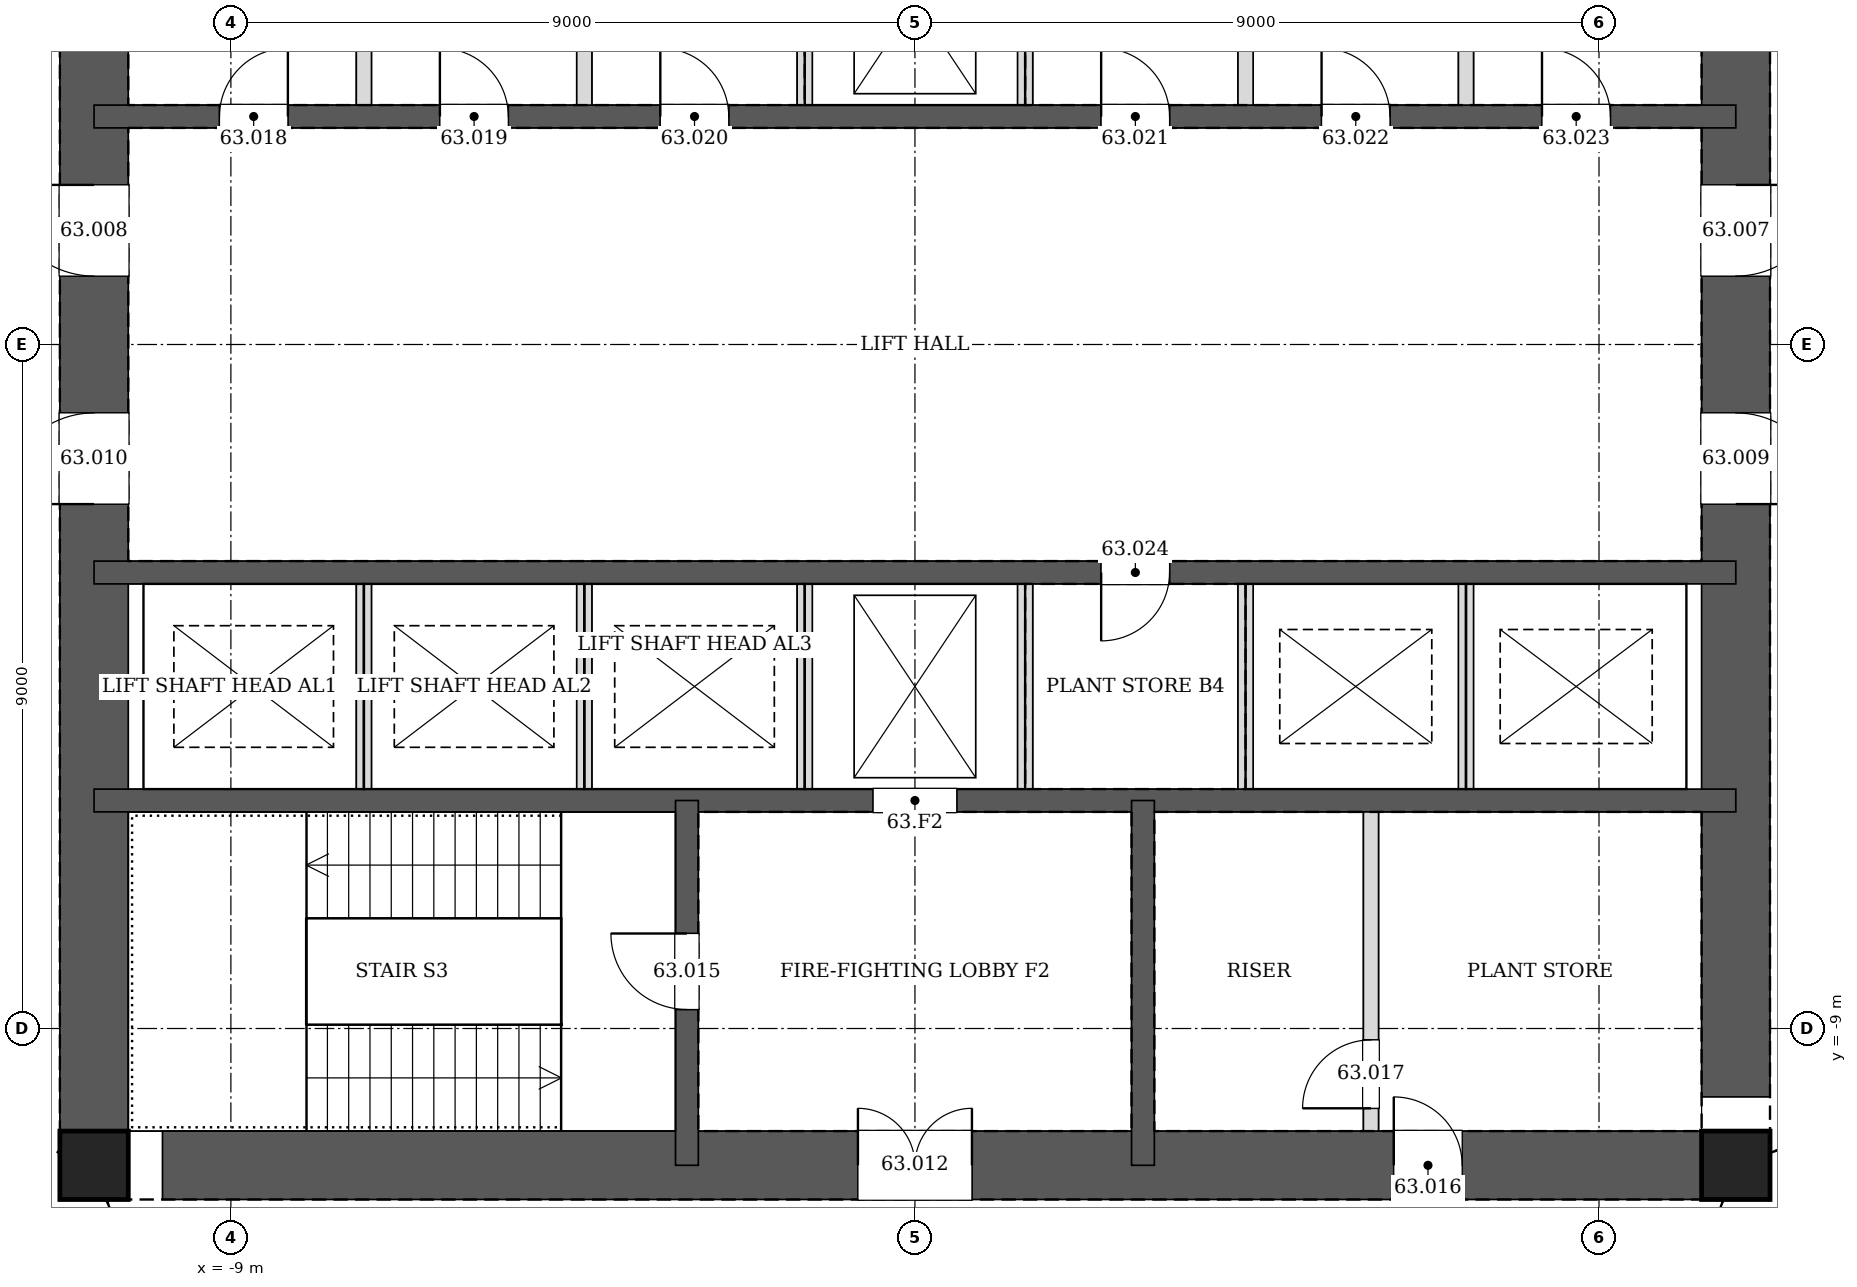
"""IFC4 building model, lengths in metres.
Left out: names, types, materials, properties, quantities, classifications, styles, units other than length and angle.
Written with IfcOpenShell. Run it as: python <this file> out.ifc"""

import sys

from ifc_helpers import new_model, si_unit, direction, frame, frame_2d, origin, origin_2d, place, context, subcontext, project, spatial, rectangle, hollow_rectangle, extrude, element, fill, save


model = new_model("IFC4")
c1 = context("Model", 3, precision=1e-05, world=origin(), true_north=direction((0.0, 1.0)))
c2 = subcontext(c1, "Body", "Model", "MODEL_VIEW")
j1 = project(units=[si_unit("LENGTHUNIT", "METRE"), si_unit("PLANEANGLEUNIT", "RADIAN")], contexts=[c1])
p1 = place(None, origin())
s1 = spatial("IfcSite", under=j1, at=p1, CompositionType="ELEMENT")
p2 = place(p1, origin())
s2 = spatial("IfcBuilding", under=s1, at=p2, CompositionType="ELEMENT")
p3 = place(p2, frame((0.0, 0.0, 261.8)))
s3 = spatial("IfcBuildingStorey", under=s2, at=p3, CompositionType="ELEMENT", Elevation=261.8)
for number, where, z_axis, x_axis in (
    (1, (-10.8, -10.8, 0.0), (0.0, 0.0, 1.0), (1.0, 0.0, 0.0)),
    (2, (10.8, -10.8, 0.0), (0.0, 0.0, 1.0), (1.0, 0.0, 0.0)),
):
    element("IfcColumn", number, at=place(p3, frame(where, z_axis=z_axis, x_axis=x_axis)), inside=s3, PredefinedType="COLUMN", context=c2, shape_type="SweptSolid", body=[
        extrude(hollow_rectangle(XDim=0.9, YDim=0.9, WallThickness=0.04, at=origin_2d()), origin(), (0.0, 0.0, 1.0), 4.5),
    ])
p4 = place(p3, frame((-10.8, -10.8, 0.0), z_axis=(0.0, 0.0, 1.0), x_axis=(1.0, 0.0, 0.0)))
e3 = element("IfcWall", 3, at=p4, inside=s3, PredefinedType="SOLIDWALL", context=c2, shape_type="SweptSolid", body=[
    extrude(rectangle(XDim=21.6, YDim=0.9, at=frame_2d((10.8, 0.0))), origin(), (0.0, 0.0, 1.0), 4.5),
])
p5 = place(p4, frame((10.05, 0.0, 0.0)))
e4 = element("IfcOpeningElement", 4, at=p5, cuts=e3, PredefinedType="OPENING", context=c2, shape_type="SweptSolid", body=[
    extrude(rectangle(XDim=1.5, YDim=2.1, at=frame_2d((0.75, 1.05))), frame((0.0, 0.46, 0.0), z_axis=(0.0, -1.0, 0.0), x_axis=(1.0, 0.0, 0.0)), (0.0, 0.0, 1.0), 0.92),
])
p6 = place(p4, frame((17.1, 0.0, 0.0)))
e5 = element("IfcOpeningElement", 5, at=p6, cuts=e3, PredefinedType="OPENING", context=c2, shape_type="SweptSolid", body=[
    extrude(rectangle(XDim=0.9, YDim=2.1, at=frame_2d((0.45, 1.05))), frame((0.0, 0.46, 0.0), z_axis=(0.0, -1.0, 0.0), x_axis=(1.0, 0.0, 0.0)), (0.0, 0.0, 1.0), 0.92),
])
p7 = place(p3, frame((10.8, -10.8, 0.0), z_axis=(0.0, 0.0, 1.0), x_axis=(0.0, 1.0, 0.0)))
e6 = element("IfcWall", 6, at=p7, inside=s3, PredefinedType="SOLIDWALL", context=c2, shape_type="SweptSolid", body=[
    extrude(rectangle(XDim=21.6, YDim=0.9, at=frame_2d((10.8, 0.0))), origin(), (0.0, 0.0, 1.0), 4.5),
])
p8 = place(p7, frame((11.7, 0.0, 0.0)))
e7 = element("IfcOpeningElement", 7, at=p8, cuts=e6, PredefinedType="OPENING", context=c2, shape_type="SweptSolid", body=[
    extrude(rectangle(XDim=1.2, YDim=2.1, at=frame_2d((0.6, 1.05))), frame((0.0, 0.46, 0.0), z_axis=(0.0, -1.0, 0.0), x_axis=(1.0, 0.0, 0.0)), (0.0, 0.0, 1.0), 0.92),
])
p9 = place(p7, frame((8.7, 0.0, 0.0)))
e8 = element("IfcOpeningElement", 8, at=p9, cuts=e6, PredefinedType="OPENING", context=c2, shape_type="SweptSolid", body=[
    extrude(rectangle(XDim=1.2, YDim=2.1, at=frame_2d((0.6, 1.05))), frame((0.0, 0.46, 0.0), z_axis=(0.0, -1.0, 0.0), x_axis=(1.0, 0.0, 0.0)), (0.0, 0.0, 1.0), 0.92),
])
p10 = place(p3, frame((-10.8, 10.8, 0.0), z_axis=(0.0, 0.0, 1.0), x_axis=(0.0, -1.0, 0.0)))
e9 = element("IfcWall", 9, at=p10, inside=s3, PredefinedType="SOLIDWALL", context=c2, shape_type="SweptSolid", body=[
    extrude(rectangle(XDim=21.6, YDim=0.9, at=frame_2d((10.8, 0.0))), origin(), (0.0, 0.0, 1.0), 4.5),
])
p11 = place(p10, frame((8.7, 0.0, 0.0)))
e10 = element("IfcOpeningElement", 10, at=p11, cuts=e9, PredefinedType="OPENING", context=c2, shape_type="SweptSolid", body=[
    extrude(rectangle(XDim=1.2, YDim=2.1, at=frame_2d((0.6, 1.05))), frame((0.0, 0.46, 0.0), z_axis=(0.0, -1.0, 0.0), x_axis=(1.0, 0.0, 0.0)), (0.0, 0.0, 1.0), 0.92),
])
p12 = place(p10, frame((11.7, 0.0, 0.0)))
e11 = element("IfcOpeningElement", 11, at=p12, cuts=e9, PredefinedType="OPENING", context=c2, shape_type="SweptSolid", body=[
    extrude(rectangle(XDim=1.2, YDim=2.1, at=frame_2d((0.6, 1.05))), frame((0.0, 0.46, 0.0), z_axis=(0.0, -1.0, 0.0), x_axis=(1.0, 0.0, 0.0)), (0.0, 0.0, 1.0), 0.92),
])
p13 = place(p3, frame((-10.8, 3.0, 0.0), z_axis=(0.0, 0.0, 1.0), x_axis=(1.0, 0.0, 0.0)))
e12 = element("IfcWall", 12, at=p13, inside=s3, PredefinedType="SOLIDWALL", context=c2, shape_type="SweptSolid", body=[
    extrude(rectangle(XDim=21.6, YDim=0.3, at=frame_2d((10.8, 0.0))), origin(), (0.0, 0.0, 1.0), 4.5),
])
p14 = place(p13, frame((1.65, 0.0, 0.0)))
e13 = element("IfcOpeningElement", 13, at=p14, cuts=e12, PredefinedType="OPENING", context=c2, shape_type="SweptSolid", body=[
    extrude(rectangle(XDim=0.9, YDim=2.1, at=frame_2d((0.45, 1.05))), frame((0.0, 0.16, 0.0), z_axis=(0.0, -1.0, 0.0), x_axis=(1.0, 0.0, 0.0)), (0.0, 0.0, 1.0), 0.32),
])
p15 = place(p13, frame((4.55, 0.0, 0.0)))
e14 = element("IfcOpeningElement", 14, at=p15, cuts=e12, PredefinedType="OPENING", context=c2, shape_type="SweptSolid", body=[
    extrude(rectangle(XDim=0.9, YDim=2.1, at=frame_2d((0.45, 1.05))), frame((0.0, 0.16, 0.0), z_axis=(0.0, -1.0, 0.0), x_axis=(1.0, 0.0, 0.0)), (0.0, 0.0, 1.0), 0.32),
])
p16 = place(p13, frame((7.45, 0.0, 0.0)))
e15 = element("IfcOpeningElement", 15, at=p16, cuts=e12, PredefinedType="OPENING", context=c2, shape_type="SweptSolid", body=[
    extrude(rectangle(XDim=0.9, YDim=2.1, at=frame_2d((0.45, 1.05))), frame((0.0, 0.16, 0.0), z_axis=(0.0, -1.0, 0.0), x_axis=(1.0, 0.0, 0.0)), (0.0, 0.0, 1.0), 0.32),
])
p17 = place(p13, frame((13.25, 0.0, 0.0)))
e16 = element("IfcOpeningElement", 16, at=p17, cuts=e12, PredefinedType="OPENING", context=c2, shape_type="SweptSolid", body=[
    extrude(rectangle(XDim=0.9, YDim=2.1, at=frame_2d((0.45, 1.05))), frame((0.0, 0.16, 0.0), z_axis=(0.0, -1.0, 0.0), x_axis=(1.0, 0.0, 0.0)), (0.0, 0.0, 1.0), 0.32),
])
p18 = place(p13, frame((16.15, 0.0, 0.0)))
e17 = element("IfcOpeningElement", 17, at=p18, cuts=e12, PredefinedType="OPENING", context=c2, shape_type="SweptSolid", body=[
    extrude(rectangle(XDim=0.9, YDim=2.1, at=frame_2d((0.45, 1.05))), frame((0.0, 0.16, 0.0), z_axis=(0.0, -1.0, 0.0), x_axis=(1.0, 0.0, 0.0)), (0.0, 0.0, 1.0), 0.32),
])
p19 = place(p13, frame((19.05, 0.0, 0.0)))
e18 = element("IfcOpeningElement", 18, at=p19, cuts=e12, PredefinedType="OPENING", context=c2, shape_type="SweptSolid", body=[
    extrude(rectangle(XDim=0.9, YDim=2.1, at=frame_2d((0.45, 1.05))), frame((0.0, 0.16, 0.0), z_axis=(0.0, -1.0, 0.0), x_axis=(1.0, 0.0, 0.0)), (0.0, 0.0, 1.0), 0.32),
])
p20 = place(p3, frame((-10.8, -3.0, 0.0), z_axis=(0.0, 0.0, 1.0), x_axis=(1.0, 0.0, 0.0)))
e19 = element("IfcWall", 19, at=p20, inside=s3, PredefinedType="SOLIDWALL", context=c2, shape_type="SweptSolid", body=[
    extrude(rectangle(XDim=21.6, YDim=0.3, at=frame_2d((10.8, 0.0))), origin(), (0.0, 0.0, 1.0), 4.5),
])
p21 = place(p20, frame((13.25, 0.0, 0.0)))
e20 = element("IfcOpeningElement", 20, at=p21, cuts=e19, PredefinedType="OPENING", context=c2, shape_type="SweptSolid", body=[
    extrude(rectangle(XDim=0.9, YDim=2.1, at=frame_2d((0.45, 1.05))), frame((0.0, 0.16, 0.0), z_axis=(0.0, -1.0, 0.0), x_axis=(1.0, 0.0, 0.0)), (0.0, 0.0, 1.0), 0.32),
])
p22 = place(p3, frame((-10.8, -6.0, 0.0), z_axis=(0.0, 0.0, 1.0), x_axis=(1.0, 0.0, 0.0)))
e21 = element("IfcWall", 21, at=p22, inside=s3, PredefinedType="SOLIDWALL", context=c2, shape_type="SweptSolid", body=[
    extrude(rectangle(XDim=21.6, YDim=0.3, at=frame_2d((10.8, 0.0))), origin(), (0.0, 0.0, 1.0), 4.5),
])
p23 = place(p22, frame((10.25, 0.0, 0.0)))
e22 = element("IfcOpeningElement", 22, at=p23, cuts=e21, PredefinedType="OPENING", context=c2, shape_type="SweptSolid", body=[
    extrude(rectangle(XDim=1.1, YDim=2.1, at=frame_2d((0.55, 1.05))), frame((0.0, 0.16, 0.0), z_axis=(0.0, -1.0, 0.0), x_axis=(1.0, 0.0, 0.0)), (0.0, 0.0, 1.0), 0.32),
])
p24 = place(p3, frame((-3.0, -6.0, 0.0), z_axis=(0.0, 0.0, 1.0), x_axis=(0.0, -1.0, 0.0)))
e23 = element("IfcWall", 23, at=p24, inside=s3, PredefinedType="SOLIDWALL", context=c2, shape_type="SweptSolid", body=[
    extrude(rectangle(XDim=4.8, YDim=0.3, at=frame_2d((2.4, 0.0))), origin(), (0.0, 0.0, 1.0), 4.5),
])
p25 = place(p24, frame((1.75, 0.0, 0.0)))
e24 = element("IfcOpeningElement", 24, at=p25, cuts=e23, PredefinedType="OPENING", context=c2, shape_type="SweptSolid", body=[
    extrude(rectangle(XDim=1.0, YDim=2.1, at=frame_2d((0.5, 1.05))), frame((0.0, 0.16, 0.0), z_axis=(0.0, -1.0, 0.0), x_axis=(1.0, 0.0, 0.0)), (0.0, 0.0, 1.0), 0.32),
])
p26 = place(p3, frame((3.0, -6.0, 0.0), z_axis=(0.0, 0.0, 1.0), x_axis=(0.0, -1.0, 0.0)))
e25 = element("IfcWall", 25, at=p26, inside=s3, PredefinedType="SOLIDWALL", context=c2, shape_type="SweptSolid", body=[
    extrude(rectangle(XDim=4.8, YDim=0.3, at=frame_2d((2.4, 0.0))), origin(), (0.0, 0.0, 1.0), 4.5),
])
for number, where, z_axis, x_axis in (
    (26, (-7.25, 3.15, 0.0), (0.0, 0.0, 1.0), (0.0, 1.0, 0.0)),
    (27, (-4.35, 3.15, 0.0), (0.0, 0.0, 1.0), (0.0, 1.0, 0.0)),
    (28, (-1.45, 3.15, 0.0), (0.0, 0.0, 1.0), (0.0, 1.0, 0.0)),
    (29, (1.45, 3.15, 0.0), (0.0, 0.0, 1.0), (0.0, 1.0, 0.0)),
    (30, (4.35, 3.15, 0.0), (0.0, 0.0, 1.0), (0.0, 1.0, 0.0)),
    (31, (7.25, 3.15, 0.0), (0.0, 0.0, 1.0), (0.0, 1.0, 0.0)),
    (32, (-7.25, -5.85, 0.0), (0.0, 0.0, 1.0), (0.0, 1.0, 0.0)),
    (33, (-4.35, -5.85, 0.0), (0.0, 0.0, 1.0), (0.0, 1.0, 0.0)),
    (34, (-1.45, -5.85, 0.0), (0.0, 0.0, 1.0), (0.0, 1.0, 0.0)),
    (35, (1.45, -5.85, 0.0), (0.0, 0.0, 1.0), (0.0, 1.0, 0.0)),
    (36, (4.35, -5.85, 0.0), (0.0, 0.0, 1.0), (0.0, 1.0, 0.0)),
):
    element("IfcWall", number, at=place(p3, frame(where, z_axis=z_axis, x_axis=x_axis)), inside=s3, PredefinedType="PARTITIONING", context=c2, shape_type="SweptSolid", body=[
        extrude(rectangle(XDim=2.7, YDim=0.2, at=frame_2d((1.35, 0.0))), origin(), (0.0, 0.0, 1.0), 4.25),
    ])
p27 = place(p3, frame((7.25, -5.85, 0.0), z_axis=(0.0, 0.0, 1.0), x_axis=(0.0, 1.0, 0.0)))
e37 = element("IfcWall", 37, at=p27, inside=s3, PredefinedType="PARTITIONING", context=c2, shape_type="SweptSolid", body=[
    extrude(rectangle(XDim=2.7, YDim=0.2, at=frame_2d((1.35, 0.0))), origin(), (0.0, 0.0, 1.0), 4.5),
])
p28 = place(p3, frame((6.0, -10.35, 0.0), z_axis=(0.0, 0.0, 1.0), x_axis=(0.0, 1.0, 0.0)))
e38 = element("IfcWall", 38, at=p28, inside=s3, PredefinedType="PARTITIONING", context=c2, shape_type="SweptSolid", body=[
    extrude(rectangle(XDim=4.2, YDim=0.2, at=frame_2d((2.1, 0.0))), origin(), (0.0, 0.0, 1.0), 4.25),
])
p29 = place(p28, frame((0.3, 0.0, 0.0)))
e39 = element("IfcOpeningElement", 39, at=p29, cuts=e38, PredefinedType="OPENING", context=c2, shape_type="SweptSolid", body=[
    extrude(rectangle(XDim=0.9, YDim=2.1, at=frame_2d((0.45, 1.05))), frame((0.0, 0.11, 0.0), z_axis=(0.0, -1.0, 0.0), x_axis=(1.0, 0.0, 0.0)), (0.0, 0.0, 1.0), 0.22),
])
p30 = place(p8, frame((1.2, 0.0, 0.0), z_axis=(0.0, 0.0, 1.0), x_axis=(-1.0, 0.0, 0.0)))
e40 = element("IfcDoor", 40, at=p30, inside=s3, OperationType="SINGLE_SWING_LEFT", PredefinedType="DOOR", context=c2, shape_type="SweptSolid", body=[
    extrude(rectangle(XDim=1.2, YDim=2.1, at=frame_2d((0.6, 1.05))), frame((0.0, 0.025, 0.0), z_axis=(0.0, -1.0, 0.0), x_axis=(1.0, 0.0, 0.0)), (0.0, 0.0, 1.0), 0.05),
])
fill(e7, e40)
p31 = place(p11, frame((1.2, 0.0, 0.0), z_axis=(0.0, 0.0, 1.0), x_axis=(-1.0, 0.0, 0.0)))
e41 = element("IfcDoor", 41, at=p31, inside=s3, OperationType="SINGLE_SWING_RIGHT", PredefinedType="DOOR", context=c2, shape_type="SweptSolid", body=[
    extrude(rectangle(XDim=1.2, YDim=2.1, at=frame_2d((0.6, 1.05))), frame((0.0, 0.025, 0.0), z_axis=(0.0, -1.0, 0.0), x_axis=(1.0, 0.0, 0.0)), (0.0, 0.0, 1.0), 0.05),
])
fill(e10, e41)
p32 = place(p9, frame((1.2, 0.0, 0.0), z_axis=(0.0, 0.0, 1.0), x_axis=(-1.0, 0.0, 0.0)))
e42 = element("IfcDoor", 42, at=p32, inside=s3, OperationType="SINGLE_SWING_RIGHT", PredefinedType="DOOR", context=c2, shape_type="SweptSolid", body=[
    extrude(rectangle(XDim=1.2, YDim=2.1, at=frame_2d((0.6, 1.05))), frame((0.0, 0.025, 0.0), z_axis=(0.0, -1.0, 0.0), x_axis=(1.0, 0.0, 0.0)), (0.0, 0.0, 1.0), 0.05),
])
fill(e8, e42)
p33 = place(p12, frame((1.2, 0.0, 0.0), z_axis=(0.0, 0.0, 1.0), x_axis=(-1.0, 0.0, 0.0)))
e43 = element("IfcDoor", 43, at=p33, inside=s3, OperationType="SINGLE_SWING_LEFT", PredefinedType="DOOR", context=c2, shape_type="SweptSolid", body=[
    extrude(rectangle(XDim=1.2, YDim=2.1, at=frame_2d((0.6, 1.05))), frame((0.0, 0.025, 0.0), z_axis=(0.0, -1.0, 0.0), x_axis=(1.0, 0.0, 0.0)), (0.0, 0.0, 1.0), 0.05),
])
fill(e11, e43)
p34 = place(p5, origin())
e44 = element("IfcDoor", 44, at=p34, inside=s3, OperationType="DOUBLE_DOOR_SINGLE_SWING", PredefinedType="DOOR", context=c2, shape_type="SweptSolid", body=[
    extrude(rectangle(XDim=1.5, YDim=2.1, at=frame_2d((0.75, 1.05))), frame((0.0, 0.025, 0.0), z_axis=(0.0, -1.0, 0.0), x_axis=(1.0, 0.0, 0.0)), (0.0, 0.0, 1.0), 0.05),
])
fill(e4, e44)
p35 = place(p25, frame((1.0, 0.0, 0.0), z_axis=(0.0, 0.0, 1.0), x_axis=(-1.0, 0.0, 0.0)))
e45 = element("IfcDoor", 45, at=p35, inside=s3, OperationType="SINGLE_SWING_RIGHT", PredefinedType="DOOR", context=c2, shape_type="SweptSolid", body=[
    extrude(rectangle(XDim=1.0, YDim=2.1, at=frame_2d((0.5, 1.05))), frame((0.0, 0.025, 0.0), z_axis=(0.0, -1.0, 0.0), x_axis=(1.0, 0.0, 0.0)), (0.0, 0.0, 1.0), 0.05),
])
fill(e24, e45)
p36 = place(p6, origin())
e46 = element("IfcDoor", 46, at=p36, inside=s3, OperationType="SINGLE_SWING_LEFT", PredefinedType="DOOR", context=c2, shape_type="SweptSolid", body=[
    extrude(rectangle(XDim=0.9, YDim=2.1, at=frame_2d((0.45, 1.05))), frame((0.0, 0.025, 0.0), z_axis=(0.0, -1.0, 0.0), x_axis=(1.0, 0.0, 0.0)), (0.0, 0.0, 1.0), 0.05),
])
fill(e5, e46)
p37 = place(p29, origin())
e47 = element("IfcDoor", 47, at=p37, inside=s3, OperationType="SINGLE_SWING_LEFT", PredefinedType="DOOR", context=c2, shape_type="SweptSolid", body=[
    extrude(rectangle(XDim=0.9, YDim=2.1, at=frame_2d((0.45, 1.05))), frame((0.0, 0.025, 0.0), z_axis=(0.0, -1.0, 0.0), x_axis=(1.0, 0.0, 0.0)), (0.0, 0.0, 1.0), 0.05),
])
fill(e39, e47)
p38 = place(p14, origin())
e48 = element("IfcDoor", 48, at=p38, inside=s3, OperationType="SINGLE_SWING_RIGHT", PredefinedType="DOOR", context=c2, shape_type="SweptSolid", body=[
    extrude(rectangle(XDim=0.9, YDim=2.1, at=frame_2d((0.45, 1.05))), frame((0.0, 0.025, 0.0), z_axis=(0.0, -1.0, 0.0), x_axis=(1.0, 0.0, 0.0)), (0.0, 0.0, 1.0), 0.05),
])
fill(e13, e48)
p39 = place(p15, origin())
e49 = element("IfcDoor", 49, at=p39, inside=s3, OperationType="SINGLE_SWING_LEFT", PredefinedType="DOOR", context=c2, shape_type="SweptSolid", body=[
    extrude(rectangle(XDim=0.9, YDim=2.1, at=frame_2d((0.45, 1.05))), frame((0.0, 0.025, 0.0), z_axis=(0.0, -1.0, 0.0), x_axis=(1.0, 0.0, 0.0)), (0.0, 0.0, 1.0), 0.05),
])
fill(e14, e49)
p40 = place(p16, origin())
e50 = element("IfcDoor", 50, at=p40, inside=s3, OperationType="SINGLE_SWING_LEFT", PredefinedType="DOOR", context=c2, shape_type="SweptSolid", body=[
    extrude(rectangle(XDim=0.9, YDim=2.1, at=frame_2d((0.45, 1.05))), frame((0.0, 0.025, 0.0), z_axis=(0.0, -1.0, 0.0), x_axis=(1.0, 0.0, 0.0)), (0.0, 0.0, 1.0), 0.05),
])
fill(e15, e50)
p41 = place(p17, origin())
e51 = element("IfcDoor", 51, at=p41, inside=s3, OperationType="SINGLE_SWING_LEFT", PredefinedType="DOOR", context=c2, shape_type="SweptSolid", body=[
    extrude(rectangle(XDim=0.9, YDim=2.1, at=frame_2d((0.45, 1.05))), frame((0.0, 0.025, 0.0), z_axis=(0.0, -1.0, 0.0), x_axis=(1.0, 0.0, 0.0)), (0.0, 0.0, 1.0), 0.05),
])
fill(e16, e51)
p42 = place(p18, origin())
e52 = element("IfcDoor", 52, at=p42, inside=s3, OperationType="SINGLE_SWING_LEFT", PredefinedType="DOOR", context=c2, shape_type="SweptSolid", body=[
    extrude(rectangle(XDim=0.9, YDim=2.1, at=frame_2d((0.45, 1.05))), frame((0.0, 0.025, 0.0), z_axis=(0.0, -1.0, 0.0), x_axis=(1.0, 0.0, 0.0)), (0.0, 0.0, 1.0), 0.05),
])
fill(e17, e52)
p43 = place(p19, origin())
e53 = element("IfcDoor", 53, at=p43, inside=s3, OperationType="SINGLE_SWING_LEFT", PredefinedType="DOOR", context=c2, shape_type="SweptSolid", body=[
    extrude(rectangle(XDim=0.9, YDim=2.1, at=frame_2d((0.45, 1.05))), frame((0.0, 0.025, 0.0), z_axis=(0.0, -1.0, 0.0), x_axis=(1.0, 0.0, 0.0)), (0.0, 0.0, 1.0), 0.05),
])
fill(e18, e53)
p44 = place(p21, frame((0.9, 0.0, 0.0), z_axis=(0.0, 0.0, 1.0), x_axis=(-1.0, 0.0, 0.0)))
e54 = element("IfcDoor", 54, at=p44, inside=s3, OperationType="SINGLE_SWING_RIGHT", PredefinedType="DOOR", context=c2, shape_type="SweptSolid", body=[
    extrude(rectangle(XDim=0.9, YDim=2.1, at=frame_2d((0.45, 1.05))), frame((0.0, 0.025, 0.0), z_axis=(0.0, -1.0, 0.0), x_axis=(1.0, 0.0, 0.0)), (0.0, 0.0, 1.0), 0.05),
])
fill(e20, e54)
p45 = place(p23, origin())
e55 = element("IfcDoor", 55, at=p45, inside=s3, OperationType="DOUBLE_DOOR_SLIDING", PredefinedType="DOOR", context=c2, shape_type="SweptSolid", body=[
    extrude(rectangle(XDim=1.1, YDim=2.1, at=frame_2d((0.55, 1.05))), frame((0.0, 0.025, 0.0), z_axis=(0.0, -1.0, 0.0), x_axis=(1.0, 0.0, 0.0)), (0.0, 0.0, 1.0), 0.05),
])
fill(e22, e55)
save(model, sys.argv[1])
